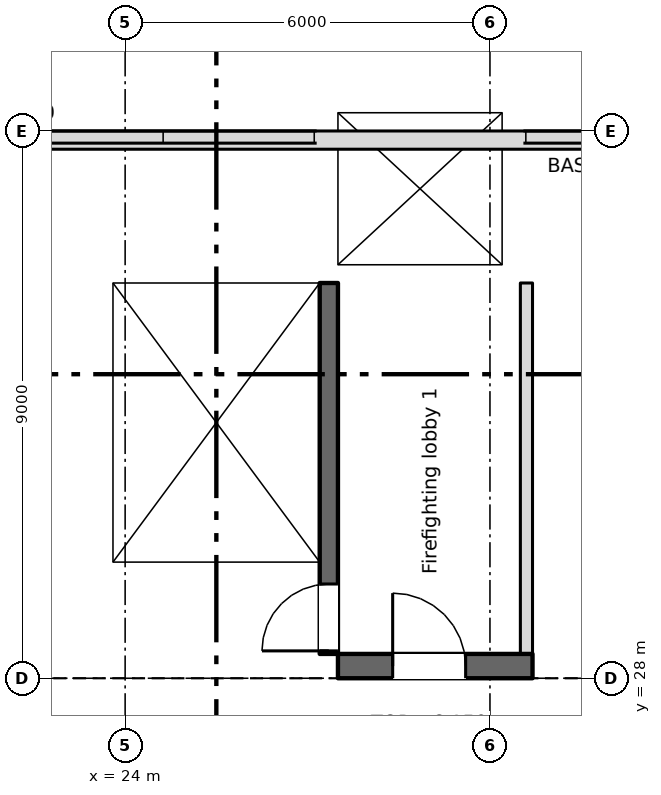
"""IFC4 building model, lengths in metres.
Left out: names, types, materials, properties, quantities, classifications, styles, units other than length and angle.
Written with IfcOpenShell. Run it as: python <this file> out.ifc"""

import sys

from ifc_helpers import new_model, si_unit, direction, frame, frame_2d, origin, place, context, subcontext, project, spatial, rectangle, extrude, element, fill, save


model = new_model("IFC4")
c1 = context("Model", 3, precision=1e-05, world=origin(), true_north=direction((0.0, 1.0)))
c2 = subcontext(c1, "Body", "Model", "MODEL_VIEW")
j1 = project(units=[si_unit("LENGTHUNIT", "METRE"), si_unit("PLANEANGLEUNIT", "RADIAN")], contexts=[c1])
p1 = place(None, origin())
s1 = spatial("IfcSite", under=j1, at=p1, CompositionType="ELEMENT")
p2 = place(p1, origin())
s2 = spatial("IfcBuilding", under=s1, at=p2, CompositionType="ELEMENT")
p3 = place(p2, frame((0.0, 0.0, 271.95)))
s3 = spatial("IfcBuildingStorey", under=s2, at=p3, CompositionType="ELEMENT", Elevation=271.95)
p4 = place(p3, frame((12.0, 36.85, 6.0), z_axis=(0.0, 0.0, 1.0), x_axis=(1.0, 0.0, 0.0)))
e1 = element("IfcWall", 1, at=p4, inside=s3, PredefinedType="PARAPET", context=c2, shape_type="SweptSolid", body=[
    extrude(rectangle(XDim=48.0, YDim=0.3, at=frame_2d((24.0, 0.0))), origin(), (0.0, 0.0, 1.0), 1.1),
])
p5 = place(p3, frame((23.65, 28.4, 0.0), z_axis=(0.0, 0.0, 1.0), x_axis=(0.0, 1.0, 0.0)))
e2 = element("IfcWall", 2, at=p5, inside=s3, PredefinedType="SHEAR", context=c2, shape_type="SweptSolid", body=[
    extrude(rectangle(XDim=6.1, YDim=0.3, at=frame_2d((3.05, 0.0))), origin(), (0.0, 0.0, 1.0), 6.0),
])
p6 = place(p3, frame((27.35, 28.4, 0.0), z_axis=(0.0, 0.0, 1.0), x_axis=(0.0, 1.0, 0.0)))
e3 = element("IfcWall", 3, at=p6, inside=s3, PredefinedType="SHEAR", context=c2, shape_type="SweptSolid", body=[
    extrude(rectangle(XDim=6.1, YDim=0.3, at=frame_2d((3.05, 0.0))), origin(), (0.0, 0.0, 1.0), 6.0),
])
p7 = place(p6, frame((0.05, 0.0, 0.0)))
e4 = element("IfcOpeningElement", 4, at=p7, cuts=e3, PredefinedType="OPENING", context=c2, shape_type="SweptSolid", body=[
    extrude(rectangle(XDim=1.1, YDim=2.1, at=frame_2d((0.55, 1.05))), frame((0.0, 0.16, 0.0), z_axis=(0.0, -1.0, 0.0), x_axis=(1.0, 0.0, 0.0)), (0.0, 0.0, 1.0), 0.32),
])
p8 = place(p3, frame((23.5, 28.2, 0.0), z_axis=(0.0, 0.0, 1.0), x_axis=(1.0, 0.0, 0.0)))
e5 = element("IfcWall", 5, at=p8, inside=s3, PredefinedType="SHEAR", context=c2, shape_type="SweptSolid", body=[
    extrude(rectangle(XDim=4.0, YDim=0.4, at=frame_2d((2.0, 0.0))), origin(), (0.0, 0.0, 1.0), 6.0),
])
p9 = place(p3, frame((27.5, 28.2, 0.0), z_axis=(0.0, 0.0, 1.0), x_axis=(1.0, 0.0, 0.0)))
e6 = element("IfcWall", 6, at=p9, inside=s3, PredefinedType="SHEAR", context=c2, shape_type="SweptSolid", body=[
    extrude(rectangle(XDim=3.2, YDim=0.4, at=frame_2d((1.6, 0.0))), origin(), (0.0, 0.0, 1.0), 5.5),
])
p10 = place(p9, frame((0.9, 0.0, 0.0)))
e7 = element("IfcOpeningElement", 7, at=p10, cuts=e6, PredefinedType="OPENING", context=c2, shape_type="SweptSolid", body=[
    extrude(rectangle(XDim=1.2, YDim=2.1, at=frame_2d((0.6, 1.05))), frame((0.0, 0.21, 0.0), z_axis=(0.0, -1.0, 0.0), x_axis=(1.0, 0.0, 0.0)), (0.0, 0.0, 1.0), 0.42),
])
p11 = place(p3, frame((23.5, 34.65, 0.0), z_axis=(0.0, 0.0, 1.0), x_axis=(1.0, 0.0, 0.0)))
e8 = element("IfcWall", 8, at=p11, inside=s3, PredefinedType="SHEAR", context=c2, shape_type="SweptSolid", body=[
    extrude(rectangle(XDim=4.0, YDim=0.3, at=frame_2d((2.0, 0.0))), origin(), (0.0, 0.0, 1.0), 6.0),
])
p12 = place(p3, frame((27.5, 34.65, 0.0), z_axis=(0.0, 0.0, 1.0), x_axis=(1.0, 0.0, 0.0)))
e9 = element("IfcWall", 9, at=p12, inside=s3, PredefinedType="SHEAR", context=c2, shape_type="SweptSolid", body=[
    extrude(rectangle(XDim=3.2, YDim=0.3, at=frame_2d((1.6, 0.0))), origin(), (0.0, 0.0, 1.0), 5.5),
])
p13 = place(p12, frame((0.8, 0.0, 0.0)))
e10 = element("IfcOpeningElement", 10, at=p13, cuts=e9, PredefinedType="OPENING", context=c2, shape_type="SweptSolid", body=[
    extrude(rectangle(XDim=1.1, YDim=2.1, at=frame_2d((0.55, 1.05))), frame((0.0, 0.16, 0.0), z_axis=(0.0, -1.0, 0.0), x_axis=(1.0, 0.0, 0.0)), (0.0, 0.0, 1.0), 0.32),
])
p14 = place(p3, frame((30.6, 28.4, 0.0), z_axis=(0.0, 0.0, 1.0), x_axis=(0.0, 1.0, 0.0)))
e11 = element("IfcWall", 11, at=p14, inside=s3, PredefinedType="PARTITIONING", context=c2, shape_type="SweptSolid", body=[
    extrude(rectangle(XDim=6.1, YDim=0.2, at=frame_2d((3.05, 0.0))), origin(), (0.0, 0.0, 1.0), 5.5),
])
p15 = place(p3, frame((27.2, 37.45, 0.0), z_axis=(0.0, 0.0, 1.0), x_axis=(1.0, 0.0, 0.0)))
e12 = element("IfcWall", 12, at=p15, inside=s3, PredefinedType="SHEAR", context=c2, shape_type="SweptSolid", body=[
    extrude(rectangle(XDim=3.3, YDim=0.3, at=frame_2d((1.65, 0.0))), origin(), (0.0, 0.0, 1.0), 5.5),
])
for number, where, z_axis, x_axis in (
    (13, (27.35, 34.8, 0.0), (0.0, 0.0, 1.0), (0.0, 1.0, 0.0)),
    (14, (30.35, 34.8, 0.0), (0.0, 0.0, 1.0), (0.0, 1.0, 0.0)),
):
    element("IfcWall", number, at=place(p3, frame(where, z_axis=z_axis, x_axis=x_axis)), inside=s3, PredefinedType="SHEAR", context=c2, shape_type="SweptSolid", body=[
        extrude(rectangle(XDim=2.5, YDim=0.3, at=frame_2d((1.25, 0.0))), origin(), (0.0, 0.0, 1.0), 5.5),
    ])
p16 = place(p7, origin())
e15 = element("IfcDoor", 15, at=p16, inside=s3, OperationType="SINGLE_SWING_LEFT", PredefinedType="DOOR", context=c2, shape_type="SweptSolid", body=[
    extrude(rectangle(XDim=1.1, YDim=2.1, at=frame_2d((0.55, 1.05))), frame((0.0, 0.025, 0.0), z_axis=(0.0, -1.0, 0.0), x_axis=(1.0, 0.0, 0.0)), (0.0, 0.0, 1.0), 0.05),
])
fill(e4, e15)
p17 = place(p10, origin())
e16 = element("IfcDoor", 16, at=p17, inside=s3, OperationType="SINGLE_SWING_LEFT", PredefinedType="DOOR", context=c2, shape_type="SweptSolid", body=[
    extrude(rectangle(XDim=1.2, YDim=2.1, at=frame_2d((0.6, 1.05))), frame((0.0, 0.025, 0.0), z_axis=(0.0, -1.0, 0.0), x_axis=(1.0, 0.0, 0.0)), (0.0, 0.0, 1.0), 0.05),
])
fill(e7, e16)
p18 = place(p13, origin())
e17 = element("IfcDoor", 17, at=p18, inside=s3, OperationType="SLIDING_TO_LEFT", PredefinedType="DOOR", context=c2, shape_type="SweptSolid", body=[
    extrude(rectangle(XDim=1.1, YDim=2.1, at=frame_2d((0.55, 1.05))), frame((0.0, 0.025, 0.0), z_axis=(0.0, -1.0, 0.0), x_axis=(1.0, 0.0, 0.0)), (0.0, 0.0, 1.0), 0.05),
])
fill(e10, e17)
save(model, sys.argv[1])
